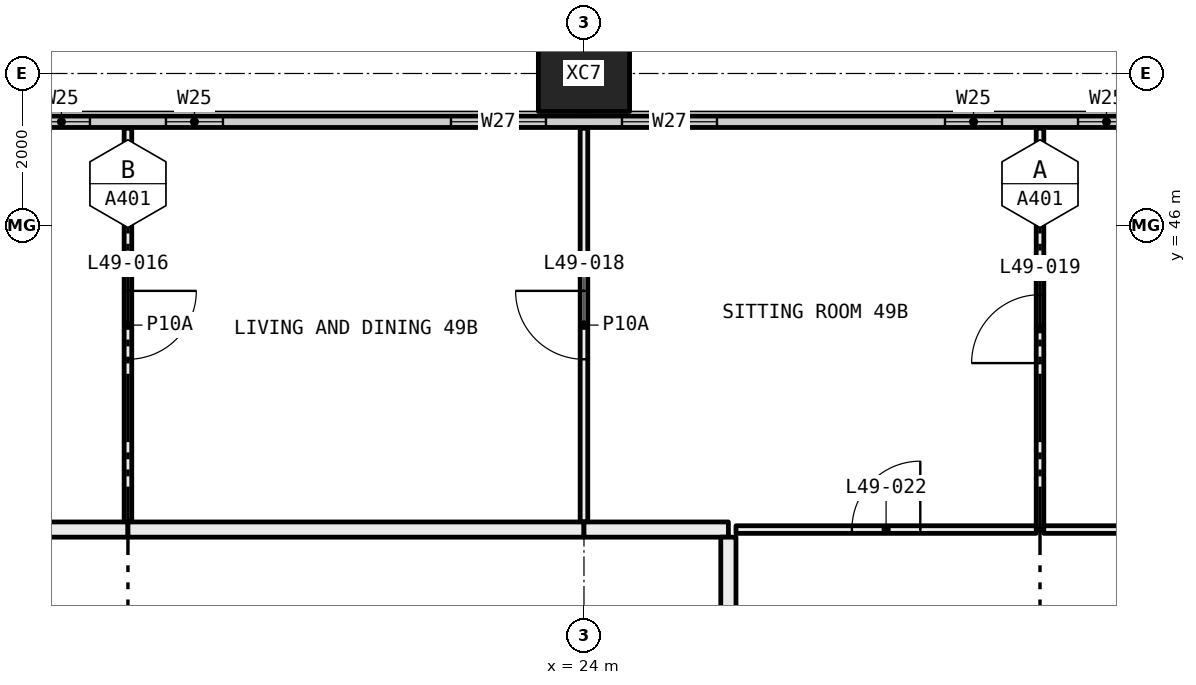
"""IFC4 building model, lengths in metres.
Left out: names, types, materials, properties, quantities, classifications, styles, units other than length and angle.
Written with IfcOpenShell. Run it as: python <this file> out.ifc"""

import sys

from ifc_helpers import new_model, si_unit, direction, frame, frame_2d, origin, origin_2d, place, context, subcontext, project, spatial, rectangle, hollow_rectangle, extrude, element, fill, save


model = new_model("IFC4")
c1 = context("Model", 3, precision=1e-05, world=origin(), true_north=direction((0.0, 1.0)))
c2 = subcontext(c1, "Body", "Model", "MODEL_VIEW")
j1 = project(units=[si_unit("LENGTHUNIT", "METRE"), si_unit("PLANEANGLEUNIT", "RADIAN")], contexts=[c1])
p1 = place(None, origin())
s1 = spatial("IfcSite", under=j1, at=p1, CompositionType="ELEMENT")
p2 = place(p1, origin())
s2 = spatial("IfcBuilding", under=s1, at=p2, CompositionType="ELEMENT")
p3 = place(p2, frame((0.0, 0.0, 185.85)))
s3 = spatial("IfcBuildingStorey", under=s2, at=p3, CompositionType="ELEMENT", Elevation=185.85)
p4 = place(p3, frame((24.0, 48.0, -0.4), z_axis=(0.0, 0.0, 1.0), x_axis=(1.0, 0.0, 0.0)))
e1 = element("IfcColumn", 1, at=p4, inside=s3, PredefinedType="COLUMN", context=c2, shape_type="SweptSolid", body=[
    extrude(hollow_rectangle(XDim=1.2, YDim=1.0, WallThickness=0.045, at=origin_2d()), origin(), (0.0, 0.0, 1.0), 3.45),
])
p5 = place(p3, frame((6.56, 47.365, 0.0), z_axis=(0.0, 0.0, 1.0), x_axis=(1.0, 0.0, 0.0)))
e2 = element("IfcWall", 2, at=p5, inside=s3, PredefinedType="ELEMENTEDWALL", context=c2, shape_type="SweptSolid", body=[
    extrude(rectangle(XDim=46.88, YDim=0.15, at=frame_2d((23.44, 0.0))), origin(), (0.0, 0.0, 1.0), 3.05),
])
p6 = place(p5, frame((0.44, 0.0, 0.45)))
e3 = element("IfcOpeningElement", 3, at=p6, cuts=e2, PredefinedType="OPENING", context=c2, shape_type="SweptSolid", body=[
    extrude(rectangle(XDim=4.5, YDim=2.55, at=frame_2d((2.25, 1.275))), frame((0.0, 0.085, 0.0), z_axis=(0.0, -1.0, 0.0), x_axis=(1.0, 0.0, 0.0)), (0.0, 0.0, 1.0), 0.17),
])
p7 = place(p5, frame((5.94, 0.0, 0.45)))
e4 = element("IfcOpeningElement", 4, at=p7, cuts=e2, PredefinedType="OPENING", context=c2, shape_type="SweptSolid", body=[
    extrude(rectangle(XDim=1.25, YDim=2.55, at=frame_2d((0.625, 1.275))), frame((0.0, 0.085, 0.0), z_axis=(0.0, -1.0, 0.0), x_axis=(1.0, 0.0, 0.0)), (0.0, 0.0, 1.0), 0.17),
])
p8 = place(p5, frame((10.19, 0.0, 0.45)))
e5 = element("IfcOpeningElement", 5, at=p8, cuts=e2, PredefinedType="OPENING", context=c2, shape_type="SweptSolid", body=[
    extrude(rectangle(XDim=0.75, YDim=2.55, at=frame_2d((0.375, 1.275))), frame((0.0, 0.085, 0.0), z_axis=(0.0, -1.0, 0.0), x_axis=(1.0, 0.0, 0.0)), (0.0, 0.0, 1.0), 0.17),
])
p9 = place(p5, frame((11.94, 0.0, 0.45)))
e6 = element("IfcOpeningElement", 6, at=p9, cuts=e2, PredefinedType="OPENING", context=c2, shape_type="SweptSolid", body=[
    extrude(rectangle(XDim=0.75, YDim=2.55, at=frame_2d((0.375, 1.275))), frame((0.0, 0.085, 0.0), z_axis=(0.0, -1.0, 0.0), x_axis=(1.0, 0.0, 0.0)), (0.0, 0.0, 1.0), 0.17),
])
p10 = place(p5, frame((15.69, 0.0, 0.45)))
e7 = element("IfcOpeningElement", 7, at=p10, cuts=e2, PredefinedType="OPENING", context=c2, shape_type="SweptSolid", body=[
    extrude(rectangle(XDim=1.25, YDim=2.55, at=frame_2d((0.625, 1.275))), frame((0.0, 0.085, 0.0), z_axis=(0.0, -1.0, 0.0), x_axis=(1.0, 0.0, 0.0)), (0.0, 0.0, 1.0), 0.17),
])
p11 = place(p5, frame((17.94, 0.0, 0.45)))
e8 = element("IfcOpeningElement", 8, at=p11, cuts=e2, PredefinedType="OPENING", context=c2, shape_type="SweptSolid", body=[
    extrude(rectangle(XDim=1.25, YDim=2.55, at=frame_2d((0.625, 1.275))), frame((0.0, 0.085, 0.0), z_axis=(0.0, -1.0, 0.0), x_axis=(1.0, 0.0, 0.0)), (0.0, 0.0, 1.0), 0.17),
])
p12 = place(p5, frame((22.19, 0.0, 0.45)))
e9 = element("IfcOpeningElement", 9, at=p12, cuts=e2, PredefinedType="OPENING", context=c2, shape_type="SweptSolid", body=[
    extrude(rectangle(XDim=0.75, YDim=2.55, at=frame_2d((0.375, 1.275))), frame((0.0, 0.085, 0.0), z_axis=(0.0, -1.0, 0.0), x_axis=(1.0, 0.0, 0.0)), (0.0, 0.0, 1.0), 0.17),
])
p13 = place(p5, frame((23.94, 0.0, 0.45)))
e10 = element("IfcOpeningElement", 10, at=p13, cuts=e2, PredefinedType="OPENING", context=c2, shape_type="SweptSolid", body=[
    extrude(rectangle(XDim=0.75, YDim=2.55, at=frame_2d((0.375, 1.275))), frame((0.0, 0.085, 0.0), z_axis=(0.0, -1.0, 0.0), x_axis=(1.0, 0.0, 0.0)), (0.0, 0.0, 1.0), 0.17),
])
p14 = place(p5, frame((27.69, 0.0, 0.45)))
e11 = element("IfcOpeningElement", 11, at=p14, cuts=e2, PredefinedType="OPENING", context=c2, shape_type="SweptSolid", body=[
    extrude(rectangle(XDim=1.25, YDim=2.55, at=frame_2d((0.625, 1.275))), frame((0.0, 0.085, 0.0), z_axis=(0.0, -1.0, 0.0), x_axis=(1.0, 0.0, 0.0)), (0.0, 0.0, 1.0), 0.17),
])
p15 = place(p5, frame((29.94, 0.0, 0.45)))
e12 = element("IfcOpeningElement", 12, at=p15, cuts=e2, PredefinedType="OPENING", context=c2, shape_type="SweptSolid", body=[
    extrude(rectangle(XDim=1.25, YDim=2.55, at=frame_2d((0.625, 1.275))), frame((0.0, 0.085, 0.0), z_axis=(0.0, -1.0, 0.0), x_axis=(1.0, 0.0, 0.0)), (0.0, 0.0, 1.0), 0.17),
])
p16 = place(p5, frame((34.19, 0.0, 0.45)))
e13 = element("IfcOpeningElement", 13, at=p16, cuts=e2, PredefinedType="OPENING", context=c2, shape_type="SweptSolid", body=[
    extrude(rectangle(XDim=0.75, YDim=2.55, at=frame_2d((0.375, 1.275))), frame((0.0, 0.085, 0.0), z_axis=(0.0, -1.0, 0.0), x_axis=(1.0, 0.0, 0.0)), (0.0, 0.0, 1.0), 0.17),
])
p17 = place(p5, frame((35.94, 0.0, 0.45)))
e14 = element("IfcOpeningElement", 14, at=p17, cuts=e2, PredefinedType="OPENING", context=c2, shape_type="SweptSolid", body=[
    extrude(rectangle(XDim=0.75, YDim=2.55, at=frame_2d((0.375, 1.275))), frame((0.0, 0.085, 0.0), z_axis=(0.0, -1.0, 0.0), x_axis=(1.0, 0.0, 0.0)), (0.0, 0.0, 1.0), 0.17),
])
p18 = place(p5, frame((39.69, 0.0, 0.45)))
e15 = element("IfcOpeningElement", 15, at=p18, cuts=e2, PredefinedType="OPENING", context=c2, shape_type="SweptSolid", body=[
    extrude(rectangle(XDim=1.25, YDim=2.55, at=frame_2d((0.625, 1.275))), frame((0.0, 0.085, 0.0), z_axis=(0.0, -1.0, 0.0), x_axis=(1.0, 0.0, 0.0)), (0.0, 0.0, 1.0), 0.17),
])
p19 = place(p5, frame((41.94, 0.0, 0.45)))
e16 = element("IfcOpeningElement", 16, at=p19, cuts=e2, PredefinedType="OPENING", context=c2, shape_type="SweptSolid", body=[
    extrude(rectangle(XDim=4.5, YDim=2.55, at=frame_2d((2.25, 1.275))), frame((0.0, 0.085, 0.0), z_axis=(0.0, -1.0, 0.0), x_axis=(1.0, 0.0, 0.0)), (0.0, 0.0, 1.0), 0.17),
])
p20 = place(p3, frame((18.0, 42.1, 0.0), z_axis=(0.0, 0.0, 1.0), x_axis=(0.0, 1.0, 0.0)))
e17 = element("IfcWall", 17, at=p20, inside=s3, PredefinedType="PARTITIONING", context=c2, shape_type="SweptSolid", body=[
    extrude(rectangle(XDim=5.18, YDim=0.1, at=frame_2d((2.59, 0.0))), origin(), (0.0, 0.0, 1.0), 3.05),
])
p21 = place(p20, frame((2.14, 0.0, 0.0)))
e18 = element("IfcOpeningElement", 18, at=p21, cuts=e17, PredefinedType="OPENING", context=c2, shape_type="SweptSolid", body=[
    extrude(rectangle(XDim=0.9, YDim=2.1, at=frame_2d((0.45, 1.05))), frame((0.0, 0.06, 0.0), z_axis=(0.0, -1.0, 0.0), x_axis=(1.0, 0.0, 0.0)), (0.0, 0.0, 1.0), 0.12),
])
p22 = place(p3, frame((12.0, 42.0, 0.0), z_axis=(0.0, 0.0, 1.0), x_axis=(1.0, 0.0, 0.0)))
e19 = element("IfcWall", 19, at=p22, inside=s3, PredefinedType="PARTITIONING", context=c2, shape_type="SweptSolid", body=[
    extrude(rectangle(XDim=6.0, YDim=0.2, at=frame_2d((3.0, 0.0))), origin(), (0.0, 0.0, 1.0), 3.05),
])
p23 = place(p22, frame((2.5, 0.0, 0.0)))
e20 = element("IfcOpeningElement", 20, at=p23, cuts=e19, PredefinedType="OPENING", context=c2, shape_type="SweptSolid", body=[
    extrude(rectangle(XDim=1.0, YDim=2.1, at=frame_2d((0.5, 1.05))), frame((0.0, 0.11, 0.0), z_axis=(0.0, -1.0, 0.0), x_axis=(1.0, 0.0, 0.0)), (0.0, 0.0, 1.0), 0.22),
])
p24 = place(p3, frame((24.0, 42.1, 0.0), z_axis=(0.0, 0.0, 1.0), x_axis=(0.0, 1.0, 0.0)))
e21 = element("IfcWall", 21, at=p24, inside=s3, PredefinedType="PARTITIONING", context=c2, shape_type="SweptSolid", body=[
    extrude(rectangle(XDim=5.18, YDim=0.1, at=frame_2d((2.59, 0.0))), origin(), (0.0, 0.0, 1.0), 3.05),
])
p25 = place(p24, frame((2.14, 0.0, 0.0)))
e22 = element("IfcOpeningElement", 22, at=p25, cuts=e21, PredefinedType="OPENING", context=c2, shape_type="SweptSolid", body=[
    extrude(rectangle(XDim=0.9, YDim=2.1, at=frame_2d((0.45, 1.05))), frame((0.0, 0.06, 0.0), z_axis=(0.0, -1.0, 0.0), x_axis=(1.0, 0.0, 0.0)), (0.0, 0.0, 1.0), 0.12),
])
p26 = place(p3, frame((18.0, 42.0, 0.0), z_axis=(0.0, 0.0, 1.0), x_axis=(1.0, 0.0, 0.0)))
e23 = element("IfcWall", 23, at=p26, inside=s3, PredefinedType="PARTITIONING", context=c2, shape_type="SweptSolid", body=[
    extrude(rectangle(XDim=6.0, YDim=0.2, at=frame_2d((3.0, 0.0))), origin(), (0.0, 0.0, 1.0), 3.05),
])
p27 = place(p3, frame((30.0, 42.0, 0.0), z_axis=(0.0, 0.0, 1.0), x_axis=(0.0, 1.0, 0.0)))
e24 = element("IfcWall", 24, at=p27, inside=s3, PredefinedType="PARTITIONING", context=c2, shape_type="SweptSolid", body=[
    extrude(rectangle(XDim=5.28, YDim=0.1, at=frame_2d((2.64, 0.0))), origin(), (0.0, 0.0, 1.0), 3.05),
])
p28 = place(p27, frame((2.19, 0.0, 0.0)))
e25 = element("IfcOpeningElement", 25, at=p28, cuts=e24, PredefinedType="OPENING", context=c2, shape_type="SweptSolid", body=[
    extrude(rectangle(XDim=0.9, YDim=2.1, at=frame_2d((0.45, 1.05))), frame((0.0, 0.06, 0.0), z_axis=(0.0, -1.0, 0.0), x_axis=(1.0, 0.0, 0.0)), (0.0, 0.0, 1.0), 0.12),
])
p29 = place(p3, frame((26.0, 42.0, 0.0), z_axis=(0.0, 0.0, 1.0), x_axis=(1.0, 0.0, 0.0)))
e26 = element("IfcWall", 26, at=p29, inside=s3, PredefinedType="PARTITIONING", context=c2, shape_type="SweptSolid", body=[
    extrude(rectangle(XDim=3.95, YDim=0.1, at=frame_2d((1.975, 0.0))), origin(), (0.0, 0.0, 1.0), 3.05),
])
p30 = place(p29, frame((1.525, 0.0, 0.0)))
e27 = element("IfcOpeningElement", 27, at=p30, cuts=e26, PredefinedType="OPENING", context=c2, shape_type="SweptSolid", body=[
    extrude(rectangle(XDim=0.9, YDim=2.1, at=frame_2d((0.45, 1.05))), frame((0.0, 0.06, 0.0), z_axis=(0.0, -1.0, 0.0), x_axis=(1.0, 0.0, 0.0)), (0.0, 0.0, 1.0), 0.12),
])
p31 = place(p3, frame((24.0, 42.0, 0.0), z_axis=(0.0, 0.0, 1.0), x_axis=(1.0, 0.0, 0.0)))
e28 = element("IfcWall", 28, at=p31, inside=s3, PredefinedType="PARTITIONING", context=c2, shape_type="SweptSolid", body=[
    extrude(rectangle(XDim=1.9, YDim=0.2, at=frame_2d((0.95, 0.0))), origin(), (0.0, 0.0, 1.0), 3.05),
])
p32 = place(p3, frame((30.05, 42.0, 0.0), z_axis=(0.0, 0.0, 1.0), x_axis=(1.0, 0.0, 0.0)))
e29 = element("IfcWall", 29, at=p32, inside=s3, PredefinedType="PARTITIONING", context=c2, shape_type="SweptSolid", body=[
    extrude(rectangle(XDim=1.45, YDim=0.1, at=frame_2d((0.725, 0.0))), origin(), (0.0, 0.0, 1.0), 3.05),
])
p33 = place(p3, frame((25.9, 41.9, 0.0), z_axis=(0.0, 0.0, 1.0), x_axis=(0.0, -1.0, 0.0)))
e30 = element("IfcWall", 30, at=p33, inside=s3, PredefinedType="PARTITIONING", context=c2, shape_type="SweptSolid", body=[
    extrude(rectangle(XDim=6.2, YDim=0.2, at=frame_2d((3.1, 0.0))), origin(), (0.0, 0.0, 1.0), 2.45),
])
p34 = place(p8, origin())
e31 = element("IfcWindow", 31, at=p34, inside=s3, PartitioningType="SINGLE_PANEL", PredefinedType="WINDOW", context=c2, shape_type="SweptSolid", body=[
    extrude(rectangle(XDim=0.75, YDim=2.55, at=frame_2d((0.375, 1.275))), frame((0.0, 0.03, 0.0), z_axis=(0.0, -1.0, 0.0), x_axis=(1.0, 0.0, 0.0)), (0.0, 0.0, 1.0), 0.06),
])
fill(e5, e31)
p35 = place(p9, origin())
e32 = element("IfcWindow", 32, at=p35, inside=s3, PartitioningType="SINGLE_PANEL", PredefinedType="WINDOW", context=c2, shape_type="SweptSolid", body=[
    extrude(rectangle(XDim=0.75, YDim=2.55, at=frame_2d((0.375, 1.275))), frame((0.0, 0.03, 0.0), z_axis=(0.0, -1.0, 0.0), x_axis=(1.0, 0.0, 0.0)), (0.0, 0.0, 1.0), 0.06),
])
fill(e6, e32)
p36 = place(p10, origin())
e33 = element("IfcWindow", 33, at=p36, inside=s3, PartitioningType="SINGLE_PANEL", PredefinedType="WINDOW", context=c2, shape_type="SweptSolid", body=[
    extrude(rectangle(XDim=1.25, YDim=2.55, at=frame_2d((0.625, 1.275))), frame((0.0, 0.03, 0.0), z_axis=(0.0, -1.0, 0.0), x_axis=(1.0, 0.0, 0.0)), (0.0, 0.0, 1.0), 0.06),
])
fill(e7, e33)
p37 = place(p11, origin())
e34 = element("IfcWindow", 34, at=p37, inside=s3, PartitioningType="SINGLE_PANEL", PredefinedType="WINDOW", context=c2, shape_type="SweptSolid", body=[
    extrude(rectangle(XDim=1.25, YDim=2.55, at=frame_2d((0.625, 1.275))), frame((0.0, 0.03, 0.0), z_axis=(0.0, -1.0, 0.0), x_axis=(1.0, 0.0, 0.0)), (0.0, 0.0, 1.0), 0.06),
])
fill(e8, e34)
p38 = place(p12, origin())
e35 = element("IfcWindow", 35, at=p38, inside=s3, PartitioningType="SINGLE_PANEL", PredefinedType="WINDOW", context=c2, shape_type="SweptSolid", body=[
    extrude(rectangle(XDim=0.75, YDim=2.55, at=frame_2d((0.375, 1.275))), frame((0.0, 0.03, 0.0), z_axis=(0.0, -1.0, 0.0), x_axis=(1.0, 0.0, 0.0)), (0.0, 0.0, 1.0), 0.06),
])
fill(e9, e35)
p39 = place(p13, origin())
e36 = element("IfcWindow", 36, at=p39, inside=s3, PartitioningType="SINGLE_PANEL", PredefinedType="WINDOW", context=c2, shape_type="SweptSolid", body=[
    extrude(rectangle(XDim=0.75, YDim=2.55, at=frame_2d((0.375, 1.275))), frame((0.0, 0.03, 0.0), z_axis=(0.0, -1.0, 0.0), x_axis=(1.0, 0.0, 0.0)), (0.0, 0.0, 1.0), 0.06),
])
fill(e10, e36)
p40 = place(p21, frame((0.9, 0.0, 0.0), x_axis=(-1.0, 0.0, 0.0)))
e37 = element("IfcDoor", 37, at=p40, inside=s3, OperationType="SINGLE_SWING_RIGHT", PredefinedType="DOOR", context=c2, shape_type="SweptSolid", body=[
    extrude(rectangle(XDim=0.9, YDim=2.1, at=frame_2d((0.45, 1.05))), frame((0.0, 0.025, 0.0), z_axis=(0.0, -1.0, 0.0), x_axis=(1.0, 0.0, 0.0)), (0.0, 0.0, 1.0), 0.05),
])
fill(e18, e37)
p41 = place(p25, origin())
e38 = element("IfcDoor", 38, at=p41, inside=s3, OperationType="SINGLE_SWING_LEFT", PredefinedType="DOOR", context=c2, shape_type="SweptSolid", body=[
    extrude(rectangle(XDim=0.9, YDim=2.1, at=frame_2d((0.45, 1.05))), frame((0.0, 0.025, 0.0), z_axis=(0.0, -1.0, 0.0), x_axis=(1.0, 0.0, 0.0)), (0.0, 0.0, 1.0), 0.05),
])
fill(e22, e38)
p42 = place(p28, origin())
e39 = element("IfcDoor", 39, at=p42, inside=s3, OperationType="SINGLE_SWING_RIGHT", PredefinedType="DOOR", context=c2, shape_type="SweptSolid", body=[
    extrude(rectangle(XDim=0.9, YDim=2.1, at=frame_2d((0.45, 1.05))), frame((0.0, 0.025, 0.0), z_axis=(0.0, -1.0, 0.0), x_axis=(1.0, 0.0, 0.0)), (0.0, 0.0, 1.0), 0.05),
])
fill(e25, e39)
p43 = place(p30, origin())
e40 = element("IfcDoor", 40, at=p43, inside=s3, OperationType="SINGLE_SWING_LEFT", PredefinedType="DOOR", context=c2, shape_type="SweptSolid", body=[
    extrude(rectangle(XDim=0.9, YDim=2.1, at=frame_2d((0.45, 1.05))), frame((0.0, 0.025, 0.0), z_axis=(0.0, -1.0, 0.0), x_axis=(1.0, 0.0, 0.0)), (0.0, 0.0, 1.0), 0.05),
])
fill(e27, e40)
save(model, sys.argv[1])
